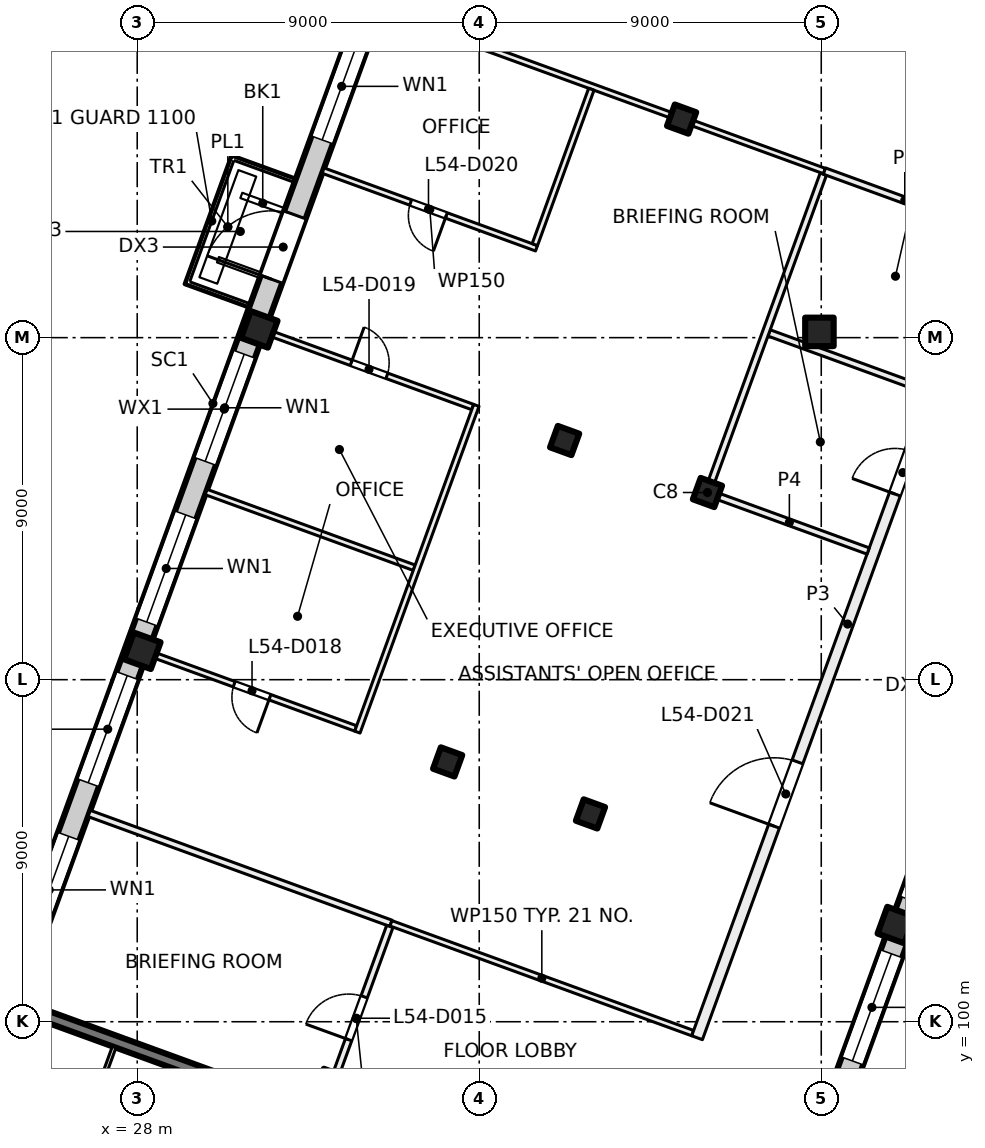
"""IFC4 building model, lengths in metres.
Left out: names, types, materials, properties, quantities, classifications, styles, units other than length and angle.
Written with IfcOpenShell. Run it as: python <this file> out.ifc"""

import sys

from ifc_helpers import new_model, si_unit, direction, frame, frame_2d, origin, origin_2d, place, context, subcontext, project, spatial, rectangle, extrude, element, fill, save


model = new_model("IFC4")
c1 = context("Model", 3, precision=1e-05, world=origin(), true_north=direction((0.0, 1.0)))
c2 = subcontext(c1, "Body", "Model", "MODEL_VIEW")
j1 = project(units=[si_unit("LENGTHUNIT", "METRE"), si_unit("PLANEANGLEUNIT", "RADIAN")], contexts=[c1])
p1 = place(None, origin())
s1 = spatial("IfcSite", under=j1, at=p1, CompositionType="ELEMENT")
p2 = place(p1, origin())
s2 = spatial("IfcBuilding", under=s1, at=p2, CompositionType="ELEMENT")
p3 = place(p2, frame((0.0, 0.0, 228.0)))
s3 = spatial("IfcBuildingStorey", under=s2, at=p3, CompositionType="ELEMENT", Elevation=228.0)
p4 = place(p3, frame((45.952, 118.152, 0.0), z_axis=(0.0, 0.0, 1.0), x_axis=(1.0, 0.0, 0.0)))
e1 = element("IfcColumn", 1, at=p4, inside=s3, PredefinedType="COLUMN", context=c2, shape_type="SweptSolid", body=[
    extrude(rectangle(XDim=0.75, YDim=0.75, at=origin_2d()), origin(), (0.0, 0.0, 1.0), 4.0),
])
for number, where, z_axis, x_axis in (
    (2, (43.006, 113.925, 0.0), (0.0, 0.0, 1.0), (-0.342, -0.94, 0.0)),
    (3, (39.927, 105.468, 0.0), (0.0, 0.0, 1.0), (-0.342, -0.94, 0.0)),
    (4, (42.325, 123.751, 0.0), (0.0, 0.0, 1.0), (-0.342, -0.94, 0.0)),
    (5, (39.247, 115.293, 0.0), (0.0, 0.0, 1.0), (-0.342, -0.94, 0.0)),
    (6, (36.169, 106.836, 0.0), (0.0, 0.0, 1.0), (-0.342, -0.94, 0.0)),
):
    element("IfcColumn", number, at=place(p3, frame(where, z_axis=z_axis, x_axis=x_axis)), inside=s3, PredefinedType="COLUMN", context=c2, shape_type="SweptSolid", body=[
        extrude(rectangle(XDim=0.6, YDim=0.6, at=origin_2d()), origin(), (0.0, 0.0, 1.0), 4.0),
    ])
for number, where, z_axis, x_axis in (
    (7, (47.962, 102.544, 0.0), (0.0, 0.0, 1.0), (-0.342, -0.94, 0.0)),
    (8, (31.212, 118.218, 0.0), (0.0, 0.0, 1.0), (-0.342, -0.94, 0.0)),
    (9, (28.134, 109.76, 0.0), (0.0, 0.0, 1.0), (-0.342, -0.94, 0.0)),
):
    element("IfcColumn", number, at=place(p3, frame(where, z_axis=z_axis, x_axis=x_axis)), inside=s3, PredefinedType="COLUMN", context=c2, shape_type="SweptSolid", body=[
        extrude(rectangle(XDim=0.75, YDim=0.75, at=origin_2d()), origin(), (0.0, 0.0, 1.0), 4.0),
    ])
p5 = place(p3, frame((32.971, 97.465, 0.0), z_axis=(0.0, 0.0, 1.0), x_axis=(-0.939695066972, 0.34201342241, 0.0)))
e10 = element("IfcWall", 10, at=p5, inside=s3, PredefinedType="SHEAR", context=c2, shape_type="SweptSolid", body=[
    extrude(rectangle(XDim=8.7, YDim=0.3, at=frame_2d((4.35, 0.0))), origin(), (0.0, 0.0, 1.0), 4.0),
])
p6 = place(p3, frame((52.212, 113.783, 0.0), z_axis=(0.0, 0.0, 1.0), x_axis=(-0.34202521188, -0.939690775968, 0.0)))
e11 = element("IfcWall", 11, at=p6, inside=s3, PredefinedType="SOLIDWALL", context=c2, shape_type="SweptSolid", body=[
    extrude(rectangle(XDim=21.745, YDim=0.6, at=frame_2d((10.873, 0.0))), origin(), (0.0, 0.0, 1.0), 3.625),
])
p7 = place(p6, frame((4.365, 0.0, 0.0)))
e12 = element("IfcOpeningElement", 12, at=p7, cuts=e11, PredefinedType="OPENING", context=c2, shape_type="SweptSolid", body=[
    extrude(rectangle(XDim=1.8, YDim=2.4, at=frame_2d((0.9, 1.2))), frame((0.0, 0.31, 0.0), z_axis=(0.0, -1.0, 0.0), x_axis=(1.0, 0.0, 0.0)), (0.0, 0.0, 1.0), 0.62),
])
p8 = place(p6, frame((8.265, 0.0, 0.9)))
e13 = element("IfcOpeningElement", 13, at=p8, cuts=e11, PredefinedType="OPENING", context=c2, shape_type="SweptSolid", body=[
    extrude(rectangle(XDim=3.0, YDim=2.4, at=frame_2d((1.5, 1.2))), frame((0.0, 0.31, 0.0), z_axis=(0.0, -1.0, 0.0), x_axis=(1.0, 0.0, 0.0)), (0.0, 0.0, 1.0), 0.62),
])
p9 = place(p6, frame((12.765, 0.0, 0.9)))
e14 = element("IfcOpeningElement", 14, at=p9, cuts=e11, PredefinedType="OPENING", context=c2, shape_type="SweptSolid", body=[
    extrude(rectangle(XDim=3.0, YDim=2.4, at=frame_2d((1.5, 1.2))), frame((0.0, 0.31, 0.0), z_axis=(0.0, -1.0, 0.0), x_axis=(1.0, 0.0, 0.0)), (0.0, 0.0, 1.0), 0.62),
])
p10 = place(p6, frame((17.265, 0.0, 0.9)))
e15 = element("IfcOpeningElement", 15, at=p10, cuts=e11, PredefinedType="OPENING", context=c2, shape_type="SweptSolid", body=[
    extrude(rectangle(XDim=3.0, YDim=2.4, at=frame_2d((1.5, 1.2))), frame((0.0, 0.31, 0.0), z_axis=(0.0, -1.0, 0.0), x_axis=(1.0, 0.0, 0.0)), (0.0, 0.0, 1.0), 0.62),
])
p11 = place(p3, frame((24.666, 100.669, 0.0), z_axis=(0.0, 0.0, 1.0), x_axis=(0.34201964167, 0.939692803373, 0.0)))
e16 = element("IfcWall", 16, at=p11, inside=s3, PredefinedType="SOLIDWALL", context=c2, shape_type="SweptSolid", body=[
    extrude(rectangle(XDim=32.884, YDim=0.6, at=frame_2d((16.442, 0.0))), origin(), (0.0, 0.0, 1.0), 3.625),
])
p12 = place(p11, frame((1.48, 0.0, 0.9)))
e17 = element("IfcOpeningElement", 17, at=p12, cuts=e16, PredefinedType="OPENING", context=c2, shape_type="SweptSolid", body=[
    extrude(rectangle(XDim=3.0, YDim=2.4, at=frame_2d((1.5, 1.2))), frame((0.0, 0.31, 0.0), z_axis=(0.0, -1.0, 0.0), x_axis=(1.0, 0.0, 0.0)), (0.0, 0.0, 1.0), 0.62),
])
p13 = place(p11, frame((5.98, 0.0, 0.9)))
e18 = element("IfcOpeningElement", 18, at=p13, cuts=e16, PredefinedType="OPENING", context=c2, shape_type="SweptSolid", body=[
    extrude(rectangle(XDim=3.0, YDim=2.4, at=frame_2d((1.5, 1.2))), frame((0.0, 0.31, 0.0), z_axis=(0.0, -1.0, 0.0), x_axis=(1.0, 0.0, 0.0)), (0.0, 0.0, 1.0), 0.62),
])
p14 = place(p11, frame((10.48, 0.0, 0.9)))
e19 = element("IfcOpeningElement", 19, at=p14, cuts=e16, PredefinedType="OPENING", context=c2, shape_type="SweptSolid", body=[
    extrude(rectangle(XDim=3.0, YDim=2.4, at=frame_2d((1.5, 1.2))), frame((0.0, 0.31, 0.0), z_axis=(0.0, -1.0, 0.0), x_axis=(1.0, 0.0, 0.0)), (0.0, 0.0, 1.0), 0.62),
])
p15 = place(p11, frame((14.98, 0.0, 0.9)))
e20 = element("IfcOpeningElement", 20, at=p15, cuts=e16, PredefinedType="OPENING", context=c2, shape_type="SweptSolid", body=[
    extrude(rectangle(XDim=3.0, YDim=2.4, at=frame_2d((1.5, 1.2))), frame((0.0, 0.31, 0.0), z_axis=(0.0, -1.0, 0.0), x_axis=(1.0, 0.0, 0.0)), (0.0, 0.0, 1.0), 0.62),
])
p16 = place(p11, frame((20.08, 0.0, 0.0)))
e21 = element("IfcOpeningElement", 21, at=p16, cuts=e16, PredefinedType="OPENING", context=c2, shape_type="SweptSolid", body=[
    extrude(rectangle(XDim=1.8, YDim=2.4, at=frame_2d((0.9, 1.2))), frame((0.0, 0.31, 0.0), z_axis=(0.0, -1.0, 0.0), x_axis=(1.0, 0.0, 0.0)), (0.0, 0.0, 1.0), 0.62),
])
p17 = place(p11, frame((23.98, 0.0, 0.9)))
e22 = element("IfcOpeningElement", 22, at=p17, cuts=e16, PredefinedType="OPENING", context=c2, shape_type="SweptSolid", body=[
    extrude(rectangle(XDim=3.0, YDim=2.4, at=frame_2d((1.5, 1.2))), frame((0.0, 0.31, 0.0), z_axis=(0.0, -1.0, 0.0), x_axis=(1.0, 0.0, 0.0)), (0.0, 0.0, 1.0), 0.62),
])
p18 = place(p11, frame((28.48, 0.0, 0.9)))
e23 = element("IfcOpeningElement", 23, at=p18, cuts=e16, PredefinedType="OPENING", context=c2, shape_type="SweptSolid", body=[
    extrude(rectangle(XDim=3.0, YDim=2.4, at=frame_2d((1.5, 1.2))), frame((0.0, 0.31, 0.0), z_axis=(0.0, -1.0, 0.0), x_axis=(1.0, 0.0, 0.0)), (0.0, 0.0, 1.0), 0.62),
])
p19 = place(p3, frame((26.676, 97.362, 0.0), z_axis=(0.0, 0.0, 1.0), x_axis=(0.342023078919, 0.939691552312, 0.0)))
e24 = element("IfcWall", 24, at=p19, inside=s3, PredefinedType="PARTITIONING", context=c2, shape_type="SweptSolid", body=[
    extrude(rectangle(XDim=2.1, YDim=0.1, at=frame_2d((1.05, 0.0))), origin(), (0.0, 0.0, 1.0), 3.625),
])
p20 = place(p3, frame((26.736, 105.48, 0.0), z_axis=(0.0, 0.0, 1.0), x_axis=(0.939706509432, -0.341981982173, 0.0)))
e25 = element("IfcWall", 25, at=p20, inside=s3, PredefinedType="PARTITIONING", context=c2, shape_type="SweptSolid", body=[
    extrude(rectangle(XDim=8.45, YDim=0.175, at=frame_2d((4.225, 0.0))), origin(), (0.0, 0.0, 1.0), 3.625),
])
p21 = place(p3, frame((29.814, 113.938, 0.0), z_axis=(0.0, 0.0, 1.0), x_axis=(0.939738354986, -0.341894463495, 0.0)))
e26 = element("IfcWall", 26, at=p21, inside=s3, PredefinedType="PARTITIONING", context=c2, shape_type="SweptSolid", body=[
    extrude(rectangle(XDim=5.826, YDim=0.15, at=frame_2d((2.913, 0.0))), origin(), (0.0, 0.0, 1.0), 3.625),
])
p22 = place(p3, frame((31.353, 118.166, 0.0), z_axis=(0.0, 0.0, 1.0), x_axis=(0.939733456466, -0.341907927371, 0.0)))
e27 = element("IfcWall", 27, at=p22, inside=s3, PredefinedType="PARTITIONING", context=c2, shape_type="SweptSolid", body=[
    extrude(rectangle(XDim=5.826, YDim=0.15, at=frame_2d((2.913, 0.0))), origin(), (0.0, 0.0, 1.0), 3.625),
])
p23 = place(p22, frame((2.423, 0.0, 0.0)))
e28 = element("IfcOpeningElement", 28, at=p23, cuts=e27, PredefinedType="OPENING", context=c2, shape_type="SweptSolid", body=[
    extrude(rectangle(XDim=1.0, YDim=2.1, at=frame_2d((0.5, 1.05))), frame((0.0, 0.085, 0.0), z_axis=(0.0, -1.0, 0.0), x_axis=(1.0, 0.0, 0.0)), (0.0, 0.0, 1.0), 0.17),
])
p24 = place(p3, frame((33.749, 107.717, 0.0), z_axis=(0.0, 0.0, 1.0), x_axis=(-0.939718757431, 0.341948324943, 0.0)))
e29 = element("IfcWall", 29, at=p24, inside=s3, PredefinedType="PARTITIONING", context=c2, shape_type="SweptSolid", body=[
    extrude(rectangle(XDim=5.825, YDim=0.15, at=frame_2d((2.913, 0.0))), origin(), (0.0, 0.0, 1.0), 3.625),
])
p25 = place(p24, frame((2.403, 0.0, 0.0)))
e30 = element("IfcOpeningElement", 30, at=p25, cuts=e29, PredefinedType="OPENING", context=c2, shape_type="SweptSolid", body=[
    extrude(rectangle(XDim=1.0, YDim=2.1, at=frame_2d((0.5, 1.05))), frame((0.0, 0.085, 0.0), z_axis=(0.0, -1.0, 0.0), x_axis=(1.0, 0.0, 0.0)), (0.0, 0.0, 1.0), 0.17),
])
p26 = place(p3, frame((36.924, 116.218, 0.0), z_axis=(0.0, 0.0, 1.0), x_axis=(-0.342220796767, -0.939619564643, 0.0)))
e31 = element("IfcWall", 31, at=p26, inside=s3, PredefinedType="PARTITIONING", context=c2, shape_type="SweptSolid", body=[
    extrude(rectangle(XDim=9.149, YDim=0.15, at=frame_2d((4.575, 0.0))), origin(), (0.0, 0.0, 1.0), 3.625),
])
p27 = place(p3, frame((34.431, 126.624, 0.0), z_axis=(0.0, 0.0, 1.0), x_axis=(0.939703144457, -0.341991228392, 0.0)))
e32 = element("IfcWall", 32, at=p27, inside=s3, PredefinedType="PARTITIONING", context=c2, shape_type="SweptSolid", body=[
    extrude(rectangle(XDim=12.401, YDim=0.15, at=frame_2d((6.2, 0.0))), origin(), (0.0, 0.0, 1.0), 3.625),
])
p28 = place(p3, frame((32.881, 97.657, 0.0), z_axis=(0.0, 0.0, 1.0), x_axis=(0.342058204353, 0.939678766832, 0.0)))
e33 = element("IfcWall", 33, at=p28, inside=s3, PredefinedType="PARTITIONING", context=c2, shape_type="SweptSolid", body=[
    extrude(rectangle(XDim=5.163, YDim=0.175, at=frame_2d((2.581, 0.0))), origin(), (0.0, 0.0, 1.0), 3.625),
])
p29 = place(p28, frame((1.991, 0.0, 0.0)))
e34 = element("IfcOpeningElement", 34, at=p29, cuts=e33, PredefinedType="OPENING", context=c2, shape_type="SweptSolid", body=[
    extrude(rectangle(XDim=1.2, YDim=2.1, at=frame_2d((0.6, 1.05))), frame((0.0, 0.097, 0.0), z_axis=(0.0, -1.0, 0.0), x_axis=(1.0, 0.0, 0.0)), (0.0, 0.0, 1.0), 0.195),
])
p30 = place(p3, frame((34.677, 102.59, 0.0), z_axis=(0.0, 0.0, 1.0), x_axis=(0.939683705252, -0.342044637561, 0.0)))
e35 = element("IfcWall", 35, at=p30, inside=s3, PredefinedType="PARTITIONING", context=c2, shape_type="SweptSolid", body=[
    extrude(rectangle(XDim=8.45, YDim=0.15, at=frame_2d((4.225, 0.0))), origin(), (0.0, 0.0, 1.0), 3.625),
])
p31 = place(p3, frame((38.507, 120.351, 0.0), z_axis=(0.0, 0.0, 1.0), x_axis=(-0.939678850769, 0.342057973766, 0.0)))
e36 = element("IfcWall", 36, at=p31, inside=s3, PredefinedType="PARTITIONING", context=c2, shape_type="SweptSolid", body=[
    extrude(rectangle(XDim=5.975, YDim=0.15, at=frame_2d((2.988, 0.0))), origin(), (0.0, 0.0, 1.0), 3.625),
])
p32 = place(p31, frame((2.525, 0.0, 0.0)))
e37 = element("IfcOpeningElement", 37, at=p32, cuts=e36, PredefinedType="OPENING", context=c2, shape_type="SweptSolid", body=[
    extrude(rectangle(XDim=1.0, YDim=2.1, at=frame_2d((0.5, 1.05))), frame((0.0, 0.085, 0.0), z_axis=(0.0, -1.0, 0.0), x_axis=(1.0, 0.0, 0.0)), (0.0, 0.0, 1.0), 0.17),
])
p33 = place(p3, frame((39.95, 124.536, 0.0), z_axis=(0.0, 0.0, 1.0), x_axis=(-0.341783611499, -0.939778677621, 0.0)))
e38 = element("IfcWall", 38, at=p33, inside=s3, PredefinedType="PARTITIONING", context=c2, shape_type="SweptSolid", body=[
    extrude(rectangle(XDim=4.351, YDim=0.15, at=frame_2d((2.175, 0.0))), origin(), (0.0, 0.0, 1.0), 3.625),
])
p34 = place(p3, frame((42.732, 99.579, 0.0), z_axis=(0.0, 0.0, 1.0), x_axis=(0.342053589012, 0.939680446877, 0.0)))
e39 = element("IfcWall", 39, at=p34, inside=s3, PredefinedType="PARTITIONING", context=c2, shape_type="SweptSolid", body=[
    extrude(rectangle(XDim=23.166, YDim=0.3, at=frame_2d((11.583, 0.0))), origin(), (0.0, 0.0, 1.0), 3.625),
])
p35 = place(p34, frame((15.225, 0.0, 0.0)))
e40 = element("IfcOpeningElement", 40, at=p35, cuts=e39, PredefinedType="OPENING", context=c2, shape_type="SweptSolid", body=[
    extrude(rectangle(XDim=1.2, YDim=2.1, at=frame_2d((0.6, 1.05))), frame((0.0, 0.16, 0.0), z_axis=(0.0, -1.0, 0.0), x_axis=(1.0, 0.0, 0.0)), (0.0, 0.0, 1.0), 0.32),
])
p36 = place(p34, frame((19.725, 0.0, 0.0)))
e41 = element("IfcOpeningElement", 41, at=p36, cuts=e39, PredefinedType="OPENING", context=c2, shape_type="SweptSolid", body=[
    extrude(rectangle(XDim=1.2, YDim=2.1, at=frame_2d((0.6, 1.05))), frame((0.0, 0.16, 0.0), z_axis=(0.0, -1.0, 0.0), x_axis=(1.0, 0.0, 0.0)), (0.0, 0.0, 1.0), 0.32),
])
p37 = place(p34, frame((5.925, 0.0, 0.0)))
e42 = element("IfcOpeningElement", 42, at=p37, cuts=e39, PredefinedType="OPENING", context=c2, shape_type="SweptSolid", body=[
    extrude(rectangle(XDim=1.8, YDim=2.1, at=frame_2d((0.9, 1.05))), frame((0.0, 0.16, 0.0), z_axis=(0.0, -1.0, 0.0), x_axis=(1.0, 0.0, 0.0)), (0.0, 0.0, 1.0), 0.32),
])
for number, where, z_axis, x_axis in (
    (43, (43.088, 113.895, 0.0), (0.0, 0.0, 1.0), (0.94, -0.342, 0.0)),
    (44, (44.627, 118.124, 0.0), (0.0, 0.0, 1.0), (0.94, -0.342, 0.0)),
):
    element("IfcWall", number, at=place(p3, frame(where, z_axis=z_axis, x_axis=x_axis)), inside=s3, PredefinedType="PARTITIONING", context=c2, shape_type="SweptSolid", body=[
        extrude(rectangle(XDim=4.412, YDim=0.175, at=frame_2d((2.206, 0.0))), origin(), (0.0, 0.0, 1.0), 3.625),
    ])
p38 = place(p3, frame((46.054, 122.301, 0.0), z_axis=(0.0, 0.0, 1.0), x_axis=(-0.341963022424, -0.939713409128, 0.0)))
e45 = element("IfcWall", 45, at=p38, inside=s3, PredefinedType="PARTITIONING", context=c2, shape_type="SweptSolid", body=[
    extrude(rectangle(XDim=9.001, YDim=0.175, at=frame_2d((4.5, 0.0))), origin(), (0.0, 0.0, 1.0), 3.625),
])
p39 = place(p3, frame((50.312, 120.843, 0.0), z_axis=(0.0, 0.0, 1.0), x_axis=(-0.939609529273, 0.342248349154, 0.0)))
e46 = element("IfcWall", 46, at=p39, inside=s3, PredefinedType="PARTITIONING", context=c2, shape_type="SweptSolid", body=[
    extrude(rectangle(XDim=4.5, YDim=0.175, at=frame_2d((2.25, 0.0))), origin(), (0.0, 0.0, 1.0), 3.625),
])
p40 = place(p9, origin())
e47 = element("IfcWindow", 47, at=p40, inside=s3, PartitioningType="SINGLE_PANEL", PredefinedType="WINDOW", context=c2, shape_type="SweptSolid", body=[
    extrude(rectangle(XDim=3.0, YDim=2.4, at=frame_2d((1.5, 1.2))), frame((0.0, 0.03, 0.0), z_axis=(0.0, -1.0, 0.0), x_axis=(1.0, 0.0, 0.0)), (0.0, 0.0, 1.0), 0.06),
])
fill(e14, e47)
p41 = place(p12, origin())
e48 = element("IfcWindow", 48, at=p41, inside=s3, PartitioningType="SINGLE_PANEL", PredefinedType="WINDOW", context=c2, shape_type="SweptSolid", body=[
    extrude(rectangle(XDim=3.0, YDim=2.4, at=frame_2d((1.5, 1.2))), frame((0.0, 0.03, 0.0), z_axis=(0.0, -1.0, 0.0), x_axis=(1.0, 0.0, 0.0)), (0.0, 0.0, 1.0), 0.06),
])
fill(e17, e48)
p42 = place(p13, origin())
e49 = element("IfcWindow", 49, at=p42, inside=s3, PartitioningType="SINGLE_PANEL", PredefinedType="WINDOW", context=c2, shape_type="SweptSolid", body=[
    extrude(rectangle(XDim=3.0, YDim=2.4, at=frame_2d((1.5, 1.2))), frame((0.0, 0.03, 0.0), z_axis=(0.0, -1.0, 0.0), x_axis=(1.0, 0.0, 0.0)), (0.0, 0.0, 1.0), 0.06),
])
fill(e18, e49)
p43 = place(p14, origin())
e50 = element("IfcWindow", 50, at=p43, inside=s3, PartitioningType="SINGLE_PANEL", PredefinedType="WINDOW", context=c2, shape_type="SweptSolid", body=[
    extrude(rectangle(XDim=3.0, YDim=2.4, at=frame_2d((1.5, 1.2))), frame((0.0, 0.03, 0.0), z_axis=(0.0, -1.0, 0.0), x_axis=(1.0, 0.0, 0.0)), (0.0, 0.0, 1.0), 0.06),
])
fill(e19, e50)
p44 = place(p15, origin())
e51 = element("IfcWindow", 51, at=p44, inside=s3, PartitioningType="SINGLE_PANEL", PredefinedType="WINDOW", context=c2, shape_type="SweptSolid", body=[
    extrude(rectangle(XDim=3.0, YDim=2.4, at=frame_2d((1.5, 1.2))), frame((0.0, 0.03, 0.0), z_axis=(0.0, -1.0, 0.0), x_axis=(1.0, 0.0, 0.0)), (0.0, 0.0, 1.0), 0.06),
])
fill(e20, e51)
p45 = place(p16, origin())
e52 = element("IfcDoor", 52, at=p45, inside=s3, OperationType="DOUBLE_DOOR_SINGLE_SWING", PredefinedType="DOOR", context=c2, shape_type="SweptSolid", body=[
    extrude(rectangle(XDim=1.8, YDim=2.4, at=frame_2d((0.9, 1.2))), frame((0.0, 0.025, 0.0), z_axis=(0.0, -1.0, 0.0), x_axis=(1.0, 0.0, 0.0)), (0.0, 0.0, 1.0), 0.05),
])
fill(e21, e52)
p46 = place(p17, origin())
e53 = element("IfcWindow", 53, at=p46, inside=s3, PartitioningType="SINGLE_PANEL", PredefinedType="WINDOW", context=c2, shape_type="SweptSolid", body=[
    extrude(rectangle(XDim=3.0, YDim=2.4, at=frame_2d((1.5, 1.2))), frame((0.0, 0.03, 0.0), z_axis=(0.0, -1.0, 0.0), x_axis=(1.0, 0.0, 0.0)), (0.0, 0.0, 1.0), 0.06),
])
fill(e22, e53)
p47 = place(p29, origin())
e54 = element("IfcDoor", 54, at=p47, inside=s3, OperationType="DOUBLE_DOOR_SINGLE_SWING", PredefinedType="DOOR", context=c2, shape_type="SweptSolid", body=[
    extrude(rectangle(XDim=1.2, YDim=2.1, at=frame_2d((0.6, 1.05))), frame((0.0, 0.025, 0.0), z_axis=(0.0, -1.0, 0.0), x_axis=(1.0, 0.0, 0.0)), (0.0, 0.0, 1.0), 0.05),
])
fill(e34, e54)
p48 = place(p35, origin())
e55 = element("IfcDoor", 55, at=p48, inside=s3, OperationType="DOUBLE_DOOR_SINGLE_SWING", PredefinedType="DOOR", context=c2, shape_type="SweptSolid", body=[
    extrude(rectangle(XDim=1.2, YDim=2.1, at=frame_2d((0.6, 1.05))), frame((0.0, 0.025, 0.0), z_axis=(0.0, -1.0, 0.0), x_axis=(1.0, 0.0, 0.0)), (0.0, 0.0, 1.0), 0.05),
])
fill(e40, e55)
p49 = place(p25, origin())
e56 = element("IfcDoor", 56, at=p49, inside=s3, OperationType="SINGLE_SWING_LEFT", PredefinedType="DOOR", context=c2, shape_type="SweptSolid", body=[
    extrude(rectangle(XDim=1.0, YDim=2.1, at=frame_2d((0.5, 1.05))), frame((0.0, 0.025, 0.0), z_axis=(0.0, -1.0, 0.0), x_axis=(1.0, 0.0, 0.0)), (0.0, 0.0, 1.0), 0.05),
])
fill(e30, e56)
p50 = place(p23, origin())
e57 = element("IfcDoor", 57, at=p50, inside=s3, OperationType="SINGLE_SWING_LEFT", PredefinedType="DOOR", context=c2, shape_type="SweptSolid", body=[
    extrude(rectangle(XDim=1.0, YDim=2.1, at=frame_2d((0.5, 1.05))), frame((0.0, 0.025, 0.0), z_axis=(0.0, -1.0, 0.0), x_axis=(1.0, 0.0, 0.0)), (0.0, 0.0, 1.0), 0.05),
])
fill(e28, e57)
p51 = place(p32, origin())
e58 = element("IfcDoor", 58, at=p51, inside=s3, OperationType="SINGLE_SWING_LEFT", PredefinedType="DOOR", context=c2, shape_type="SweptSolid", body=[
    extrude(rectangle(XDim=1.0, YDim=2.1, at=frame_2d((0.5, 1.05))), frame((0.0, 0.025, 0.0), z_axis=(0.0, -1.0, 0.0), x_axis=(1.0, 0.0, 0.0)), (0.0, 0.0, 1.0), 0.05),
])
fill(e37, e58)
p52 = place(p37, origin())
e59 = element("IfcDoor", 59, at=p52, inside=s3, OperationType="DOUBLE_DOOR_SINGLE_SWING", PredefinedType="DOOR", context=c2, shape_type="SweptSolid", body=[
    extrude(rectangle(XDim=1.8, YDim=2.1, at=frame_2d((0.9, 1.05))), frame((0.0, 0.025, 0.0), z_axis=(0.0, -1.0, 0.0), x_axis=(1.0, 0.0, 0.0)), (0.0, 0.0, 1.0), 0.05),
])
fill(e42, e59)
save(model, sys.argv[1])
